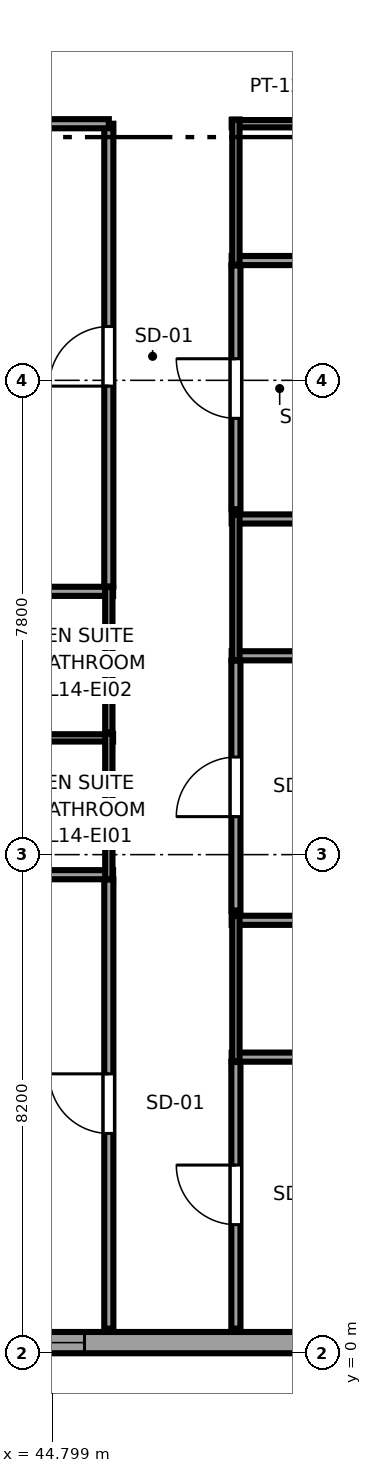
"""IFC4 building model, lengths in metres.
Left out: names, types, materials, properties, quantities, classifications, styles, units other than length and angle.
Written with IfcOpenShell. Run it as: python <this file> out.ifc"""

import sys

from ifc_helpers import new_model, si_unit, direction, frame, frame_2d, origin, place, context, subcontext, project, spatial, rectangle, extrude, source, transform, mapped, element, fill, save


model = new_model("IFC4")
c1 = context("Model", 3, precision=1e-05, world=origin(), true_north=direction((0.0, 1.0)))
c2 = subcontext(c1, "Body", "Model", "MODEL_VIEW")
j1 = project(units=[si_unit("LENGTHUNIT", "METRE"), si_unit("PLANEANGLEUNIT", "RADIAN")], contexts=[c1])
p1 = place(None, origin())
s1 = spatial("IfcSite", under=j1, at=p1, CompositionType="ELEMENT")
p2 = place(p1, origin())
s2 = spatial("IfcBuilding", under=s1, at=p2, CompositionType="ELEMENT")
p3 = place(p2, frame((0.0, 0.0, 60.4)))
s3 = spatial("IfcBuildingStorey", under=s2, at=p3, CompositionType="ELEMENT", Elevation=60.4)
p4 = place(p3, frame((34.375, 0.175, 0.0), z_axis=(0.0, 0.0, 1.0), x_axis=(1.0, 0.0, 0.0)))
e1 = element("IfcWall", 1, at=p4, inside=s3, PredefinedType="SOLIDWALL", context=c2, shape_type="SweptSolid", body=[
    extrude(rectangle(XDim=18.008, YDim=0.35, at=frame_2d((9.004, 0.0))), origin(), (0.0, 0.0, 1.0), 3.37),
])
p5 = place(p4, frame((1.801, 0.0, 0.68)))
e2 = element("IfcOpeningElement", 2, at=p5, cuts=e1, PredefinedType="OPENING", context=c2, shape_type="SweptSolid", body=[
    extrude(rectangle(XDim=1.8, YDim=1.85, at=frame_2d((0.9, 0.925))), frame((0.0, 0.185, 0.0), z_axis=(0.0, -1.0, 0.0), x_axis=(1.0, 0.0, 0.0)), (0.0, 0.0, 1.0), 0.37),
])
p6 = place(p4, frame((9.155, 0.0, 0.68)))
e3 = element("IfcOpeningElement", 3, at=p6, cuts=e1, PredefinedType="OPENING", context=c2, shape_type="SweptSolid", body=[
    extrude(rectangle(XDim=1.8, YDim=1.85, at=frame_2d((0.9, 0.925))), frame((0.0, 0.185, 0.0), z_axis=(0.0, -1.0, 0.0), x_axis=(1.0, 0.0, 0.0)), (0.0, 0.0, 1.0), 0.37),
])
p7 = place(p3, frame((43.21, 7.87, 0.0), z_axis=(0.0, 0.0, 1.0), x_axis=(1.0, 0.0, 0.0)))
e4 = element("IfcWall", 4, at=p7, inside=s3, PredefinedType="PARTITIONING", context=c2, shape_type="SweptSolid", body=[
    extrude(rectangle(XDim=2.59, YDim=0.15, at=frame_2d((1.295, 0.0))), origin(), (0.0, 0.0, 1.0), 3.37),
])
p8 = place(p3, frame((43.21, 10.12, 0.0), z_axis=(0.0, 0.0, 1.0), x_axis=(1.0, 0.0, 0.0)))
e5 = element("IfcWall", 5, at=p8, inside=s3, PredefinedType="PLUMBINGWALL", context=c2, shape_type="SweptSolid", body=[
    extrude(rectangle(XDim=2.59, YDim=0.12, at=frame_2d((1.295, 0.0))), origin(), (0.0, 0.0, 1.0), 3.37),
])
p9 = place(p3, frame((45.73, 7.8, 0.0), z_axis=(0.0, 0.0, 1.0), x_axis=(0.0, 1.0, 0.0)))
e6 = element("IfcWall", 6, at=p9, inside=s3, PredefinedType="PLUMBINGWALL", context=c2, shape_type="SweptSolid", body=[
    extrude(rectangle(XDim=2.39, YDim=0.12, at=frame_2d((1.195, 0.0))), origin(), (0.0, 0.0, 1.0), 2.954),
])
p10 = place(p3, frame((43.21, 12.53, 0.0), z_axis=(0.0, 0.0, 1.0), x_axis=(1.0, 0.0, 0.0)))
e7 = element("IfcWall", 7, at=p10, inside=s3, PredefinedType="PARTITIONING", context=c2, shape_type="SweptSolid", body=[
    extrude(rectangle(XDim=2.59, YDim=0.15, at=frame_2d((1.295, 0.0))), origin(), (0.0, 0.0, 1.0), 3.37),
])
p11 = place(p3, frame((45.73, 10.21, 0.0), z_axis=(0.0, 0.0, 1.0), x_axis=(0.0, 1.0, 0.0)))
e8 = element("IfcWall", 8, at=p11, inside=s3, PredefinedType="PLUMBINGWALL", context=c2, shape_type="SweptSolid", body=[
    extrude(rectangle(XDim=2.39, YDim=0.12, at=frame_2d((1.195, 0.0))), origin(), (0.0, 0.0, 1.0), 2.954),
])
for number, where, z_axis, x_axis in (
    (9, (47.75, 4.87, 0.0), (0.0, 0.0, 1.0), (1.0, 0.0, 0.0)),
    (10, (47.75, 7.12, 0.0), (0.0, 0.0, 1.0), (1.0, 0.0, 0.0)),
):
    element("IfcWall", number, at=place(p3, frame(where, z_axis=z_axis, x_axis=x_axis)), inside=s3, PredefinedType="PARTITIONING", context=c2, shape_type="SweptSolid", body=[
        extrude(rectangle(XDim=2.59, YDim=0.15, at=frame_2d((1.295, 0.0))), origin(), (0.0, 0.0, 1.0), 3.37),
    ])
p12 = place(p3, frame((47.82, 4.8, 0.0), z_axis=(0.0, 0.0, 1.0), x_axis=(0.0, 1.0, 0.0)))
e11 = element("IfcWall", 11, at=p12, inside=s3, PredefinedType="PLUMBINGWALL", context=c2, shape_type="SweptSolid", body=[
    extrude(rectangle(XDim=2.39, YDim=0.12, at=frame_2d((1.195, 0.0))), origin(), (0.0, 0.0, 1.0), 3.37),
])
for number, where, z_axis, x_axis in (
    (12, (47.75, 11.47, 0.0), (0.0, 0.0, 1.0), (1.0, 0.0, 0.0)),
    (13, (47.75, 13.72, 0.0), (0.0, 0.0, 1.0), (1.0, 0.0, 0.0)),
):
    element("IfcWall", number, at=place(p3, frame(where, z_axis=z_axis, x_axis=x_axis)), inside=s3, PredefinedType="PARTITIONING", context=c2, shape_type="SweptSolid", body=[
        extrude(rectangle(XDim=2.59, YDim=0.15, at=frame_2d((1.295, 0.0))), origin(), (0.0, 0.0, 1.0), 3.37),
    ])
p13 = place(p3, frame((47.82, 11.4, 0.0), z_axis=(0.0, 0.0, 1.0), x_axis=(0.0, 1.0, 0.0)))
e14 = element("IfcWall", 14, at=p13, inside=s3, PredefinedType="PLUMBINGWALL", context=c2, shape_type="SweptSolid", body=[
    extrude(rectangle(XDim=2.39, YDim=0.12, at=frame_2d((1.195, 0.0))), origin(), (0.0, 0.0, 1.0), 3.37),
])
p14 = place(p3, frame((47.75, 17.97, 0.0), z_axis=(0.0, 0.0, 1.0), x_axis=(1.0, 0.0, 0.0)))
e15 = element("IfcWall", 15, at=p14, inside=s3, PredefinedType="PARTITIONING", context=c2, shape_type="SweptSolid", body=[
    extrude(rectangle(XDim=2.59, YDim=0.15, at=frame_2d((1.295, 0.0))), origin(), (0.0, 0.0, 1.0), 3.37),
])
p15 = place(p3, frame((47.75, 20.22, 0.0), z_axis=(0.0, 0.0, 1.0), x_axis=(1.0, 0.0, 0.0)))
e16 = element("IfcWall", 16, at=p15, inside=s3, PredefinedType="PLUMBINGWALL", context=c2, shape_type="SweptSolid", body=[
    extrude(rectangle(XDim=2.59, YDim=0.12, at=frame_2d((1.295, 0.0))), origin(), (0.0, 0.0, 1.0), 3.37),
])
p16 = place(p3, frame((47.82, 17.9, 0.0), z_axis=(0.0, 0.0, 1.0), x_axis=(0.0, 1.0, 0.0)))
e17 = element("IfcWall", 17, at=p16, inside=s3, PredefinedType="PLUMBINGWALL", context=c2, shape_type="SweptSolid", body=[
    extrude(rectangle(XDim=2.39, YDim=0.12, at=frame_2d((1.195, 0.0))), origin(), (0.0, 0.0, 1.0), 3.37),
])
p17 = place(p3, frame((45.73, 0.405, 0.0), z_axis=(0.0, 0.0, 1.0), x_axis=(0.0, 1.0, 0.0)))
e18 = element("IfcWall", 18, at=p17, inside=s3, PredefinedType="PARTITIONING", context=c2, shape_type="SweptSolid", body=[
    extrude(rectangle(XDim=7.385, YDim=0.15, at=frame_2d((3.692, 0.0))), origin(), (0.0, 0.0, 1.0), 3.37),
])
p18 = place(p17, frame((3.21, 0.0, 0.0)))
e19 = element("IfcOpeningElement", 19, at=p18, cuts=e18, PredefinedType="OPENING", context=c2, shape_type="SweptSolid", body=[
    extrude(rectangle(XDim=0.98, YDim=2.12, at=frame_2d((0.49, 1.06))), frame((0.0, 0.085, 0.0), z_axis=(0.0, -1.0, 0.0), x_axis=(1.0, 0.0, 0.0)), (0.0, 0.0, 1.0), 0.17),
])
p19 = place(p3, frame((45.73, 12.61, 0.0), z_axis=(0.0, 0.0, 1.0), x_axis=(0.0, 1.0, 0.0)))
e20 = element("IfcWall", 20, at=p19, inside=s3, PredefinedType="PARTITIONING", context=c2, shape_type="SweptSolid", body=[
    extrude(rectangle(XDim=7.61, YDim=0.15, at=frame_2d((3.805, 0.0))), origin(), (0.0, 0.0, 1.0), 2.954),
])
p20 = place(p19, frame((3.295, 0.0, 0.0)))
e21 = element("IfcOpeningElement", 21, at=p20, cuts=e20, PredefinedType="OPENING", context=c2, shape_type="SweptSolid", body=[
    extrude(rectangle(XDim=0.98, YDim=2.12, at=frame_2d((0.49, 1.06))), frame((0.0, 0.085, 0.0), z_axis=(0.0, -1.0, 0.0), x_axis=(1.0, 0.0, 0.0)), (0.0, 0.0, 1.0), 0.17),
])
p21 = place(p3, frame((34.65, 20.22, 0.0), z_axis=(0.0, 0.0, 1.0), x_axis=(1.0, 0.0, 0.0)))
e22 = element("IfcWall", 22, at=p21, inside=s3, PredefinedType="PARTITIONING", context=c2, shape_type="SweptSolid", body=[
    extrude(rectangle(XDim=11.08, YDim=0.15, at=frame_2d((5.54, 0.0))), origin(), (0.0, 0.0, 1.0), 2.954),
])
p22 = place(p3, frame((47.82, 0.405, 0.0), z_axis=(0.0, 0.0, 1.0), x_axis=(0.0, 1.0, 0.0)))
e23 = element("IfcWall", 23, at=p22, inside=s3, PredefinedType="PARTITIONING", context=c2, shape_type="SweptSolid", body=[
    extrude(rectangle(XDim=4.385, YDim=0.15, at=frame_2d((2.192, 0.0))), origin(), (0.0, 0.0, 1.0), 3.37),
])
p23 = place(p22, frame((1.71, 0.0, 0.0)))
e24 = element("IfcOpeningElement", 24, at=p23, cuts=e23, PredefinedType="OPENING", context=c2, shape_type="SweptSolid", body=[
    extrude(rectangle(XDim=0.98, YDim=2.12, at=frame_2d((0.49, 1.06))), frame((0.0, 0.085, 0.0), z_axis=(0.0, -1.0, 0.0), x_axis=(1.0, 0.0, 0.0)), (0.0, 0.0, 1.0), 0.17),
])
p24 = place(p3, frame((47.82, 7.28, 0.0), z_axis=(0.0, 0.0, 1.0), x_axis=(0.0, 1.0, 0.0)))
e25 = element("IfcWall", 25, at=p24, inside=s3, PredefinedType="PARTITIONING", context=c2, shape_type="SweptSolid", body=[
    extrude(rectangle(XDim=4.11, YDim=0.15, at=frame_2d((2.055, 0.0))), origin(), (0.0, 0.0, 1.0), 3.37),
])
p25 = place(p24, frame((1.545, 0.0, 0.0)))
e26 = element("IfcOpeningElement", 26, at=p25, cuts=e25, PredefinedType="OPENING", context=c2, shape_type="SweptSolid", body=[
    extrude(rectangle(XDim=0.98, YDim=2.12, at=frame_2d((0.49, 1.06))), frame((0.0, 0.085, 0.0), z_axis=(0.0, -1.0, 0.0), x_axis=(1.0, 0.0, 0.0)), (0.0, 0.0, 1.0), 0.17),
])
p26 = place(p3, frame((47.82, 13.88, 0.0), z_axis=(0.0, 0.0, 1.0), x_axis=(0.0, 1.0, 0.0)))
e27 = element("IfcWall", 27, at=p26, inside=s3, PredefinedType="PARTITIONING", context=c2, shape_type="SweptSolid", body=[
    extrude(rectangle(XDim=4.01, YDim=0.15, at=frame_2d((2.005, 0.0))), origin(), (0.0, 0.0, 1.0), 3.37),
])
p27 = place(p26, frame((1.495, 0.0, 0.0)))
e28 = element("IfcOpeningElement", 28, at=p27, cuts=e27, PredefinedType="OPENING", context=c2, shape_type="SweptSolid", body=[
    extrude(rectangle(XDim=0.98, YDim=2.12, at=frame_2d((0.49, 1.06))), frame((0.0, 0.085, 0.0), z_axis=(0.0, -1.0, 0.0), x_axis=(1.0, 0.0, 0.0)), (0.0, 0.0, 1.0), 0.17),
])
m1 = source(origin(), c2, "Body", "SweptSolid", [
    extrude(rectangle(XDim=1.8, YDim=1.85, at=frame_2d((0.9, 0.925))), frame((0.0, 0.09, 0.0), z_axis=(0.0, -1.0, 0.0), x_axis=(1.0, 0.0, 0.0)), (0.0, 0.0, 1.0), 0.06),
])
p28 = place(p6, origin())
e29 = element("IfcWindow", 29, at=p28, inside=s3, PartitioningType="TRIPLE_PANEL_HORIZONTAL", PredefinedType="WINDOW", context=c2, shape_type="MappedRepresentation", body=[
    mapped(m1, transform((0.0, 0.0, 0.0), x_axis=(1.0, 0.0, 0.0), y_axis=(0.0, 1.0, 0.0), z_axis=(0.0, 0.0, 1.0), scale=1.0)),
])
fill(e3, e29)
m2 = source(origin(), c2, "Body", "SweptSolid", [
    extrude(rectangle(XDim=0.98, YDim=2.12, at=frame_2d((0.49, 1.06))), frame((0.0, 0.025, 0.0), z_axis=(0.0, -1.0, 0.0), x_axis=(1.0, 0.0, 0.0)), (0.0, 0.0, 1.0), 0.05),
])
p29 = place(p18, origin())
e30 = element("IfcDoor", 30, at=p29, inside=s3, OperationType="SINGLE_SWING_RIGHT", PredefinedType="DOOR", context=c2, shape_type="MappedRepresentation", body=[
    mapped(m2, transform((0.0, 0.0, 0.0), x_axis=(1.0, 0.0, 0.0), y_axis=(0.0, 1.0, 0.0), z_axis=(0.0, 0.0, 1.0), scale=1.0)),
])
fill(e19, e30)
p30 = place(p20, origin())
e31 = element("IfcDoor", 31, at=p30, inside=s3, OperationType="SINGLE_SWING_LEFT", PredefinedType="DOOR", context=c2, shape_type="MappedRepresentation", body=[
    mapped(m2, transform((0.0, 0.0, 0.0), x_axis=(1.0, 0.0, 0.0), y_axis=(0.0, 1.0, 0.0), z_axis=(0.0, 0.0, 1.0), scale=1.0)),
])
fill(e21, e31)
p31 = place(p23, origin())
e32 = element("IfcDoor", 32, at=p31, inside=s3, OperationType="SINGLE_SWING_RIGHT", PredefinedType="DOOR", context=c2, shape_type="MappedRepresentation", body=[
    mapped(m2, transform((0.0, 0.0, 0.0), x_axis=(1.0, 0.0, 0.0), y_axis=(0.0, 1.0, 0.0), z_axis=(0.0, 0.0, 1.0), scale=1.0)),
])
fill(e24, e32)
p32 = place(p25, origin())
e33 = element("IfcDoor", 33, at=p32, inside=s3, OperationType="SINGLE_SWING_LEFT", PredefinedType="DOOR", context=c2, shape_type="MappedRepresentation", body=[
    mapped(m2, transform((0.0, 0.0, 0.0), x_axis=(1.0, 0.0, 0.0), y_axis=(0.0, 1.0, 0.0), z_axis=(0.0, 0.0, 1.0), scale=1.0)),
])
fill(e26, e33)
p33 = place(p27, origin())
e34 = element("IfcDoor", 34, at=p33, inside=s3, OperationType="SINGLE_SWING_RIGHT", PredefinedType="DOOR", context=c2, shape_type="MappedRepresentation", body=[
    mapped(m2, transform((0.0, 0.0, 0.0), x_axis=(1.0, 0.0, 0.0), y_axis=(0.0, 1.0, 0.0), z_axis=(0.0, 0.0, 1.0), scale=1.0)),
])
fill(e28, e34)
save(model, sys.argv[1])
